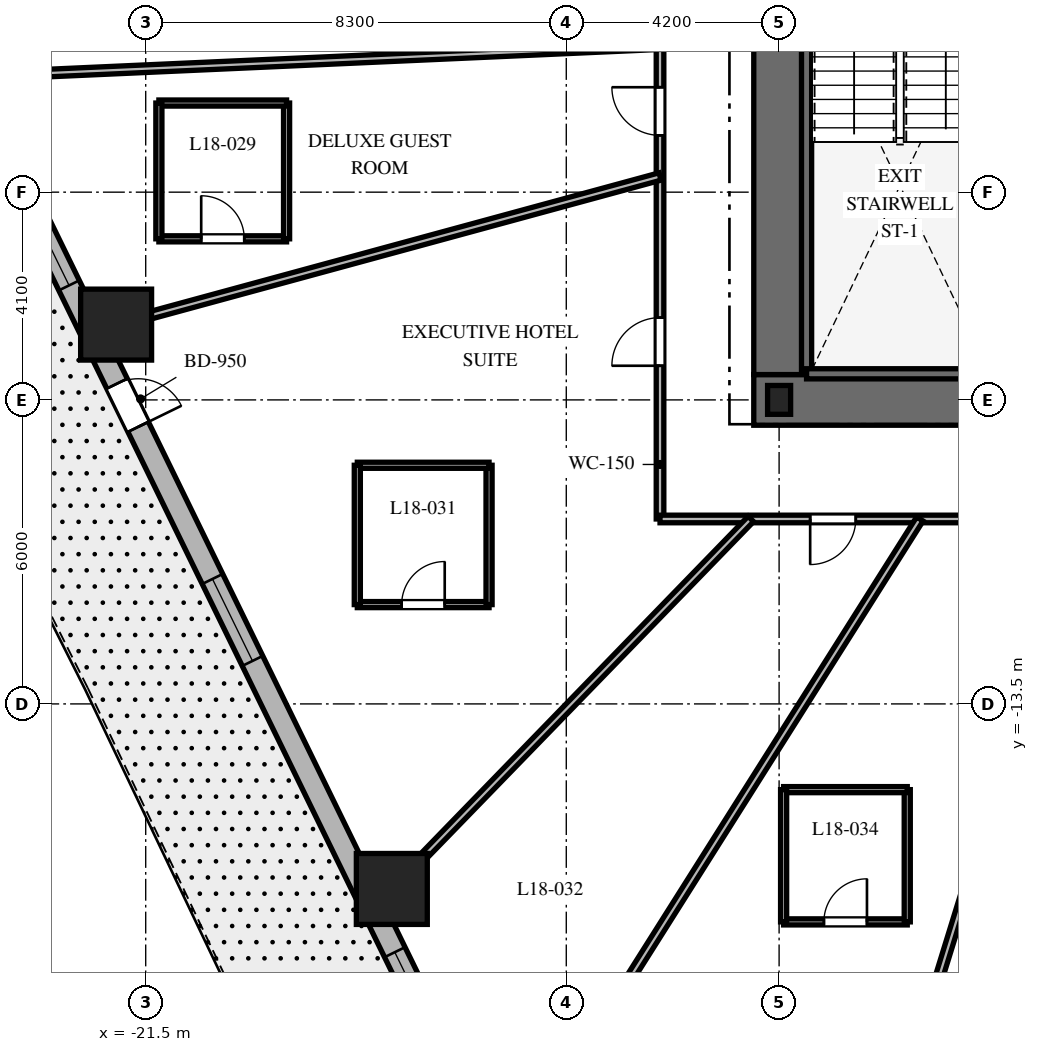
"""IFC4 building model, lengths in metres.
Left out: names, types, materials, properties, quantities, classifications, styles, units other than length and angle.
Written with IfcOpenShell. Run it as: python <this file> out.ifc"""

import sys

from ifc_helpers import new_model, si_unit, direction, frame, frame_2d, origin, origin_2d, place, context, subcontext, project, spatial, rectangle, i_section, extrude, element, fill, save


model = new_model("IFC4")
c1 = context("Model", 3, precision=1e-05, world=origin(), true_north=direction((0.0, 1.0)))
c2 = subcontext(c1, "Body", "Model", "MODEL_VIEW")
j1 = project(units=[si_unit("LENGTHUNIT", "METRE"), si_unit("PLANEANGLEUNIT", "RADIAN")], contexts=[c1])
p1 = place(None, origin())
s1 = spatial("IfcSite", under=j1, at=p1, CompositionType="ELEMENT")
p2 = place(p1, origin())
s2 = spatial("IfcBuilding", under=s1, at=p2, CompositionType="ELEMENT")
p3 = place(p2, frame((0.0, 0.0, 78.6)))
s3 = spatial("IfcBuildingStorey", under=s2, at=p3, CompositionType="ELEMENT", Elevation=78.6)
p4 = place(p3, frame((-9.5, -7.5, 0.0), z_axis=(0.0, 0.0, 1.0), x_axis=(1.0, 0.0, 0.0)))
e1 = element("IfcWall", 1, at=p4, inside=s3, PredefinedType="SHEAR", context=c2, shape_type="SweptSolid", body=[
    extrude(rectangle(XDim=19.0, YDim=1.0, at=frame_2d((9.5, 0.0))), origin(), (0.0, 0.0, 1.0), 3.7),
])
p5 = place(p4, frame((9.55, 0.0, 0.0)))
e2 = element("IfcOpeningElement", 2, at=p5, cuts=e1, PredefinedType="OPENING", context=c2, shape_type="SweptSolid", body=[
    extrude(rectangle(XDim=1.0, YDim=2.15, at=frame_2d((0.5, 1.075))), frame((0.0, 0.51, 0.0), z_axis=(0.0, -1.0, 0.0), x_axis=(1.0, 0.0, 0.0)), (0.0, 0.0, 1.0), 1.02),
])
p6 = place(p3, frame((-9.0, -7.0, 0.0), z_axis=(0.0, 0.0, 1.0), x_axis=(0.0, 1.0, 0.0)))
e3 = element("IfcWall", 3, at=p6, inside=s3, PredefinedType="SHEAR", context=c2, shape_type="SweptSolid", body=[
    extrude(rectangle(XDim=14.0, YDim=1.0, at=frame_2d((7.0, 0.0))), origin(), (0.0, 0.0, 1.0), 3.7),
])
p7 = place(p6, frame((10.125, 0.0, 0.0)))
e4 = element("IfcOpeningElement", 4, at=p7, cuts=e3, PredefinedType="OPENING", context=c2, shape_type="SweptSolid", body=[
    extrude(rectangle(XDim=1.05, YDim=2.15, at=frame_2d((0.525, 1.075))), frame((0.0, 0.51, 0.0), z_axis=(0.0, -1.0, 0.0), x_axis=(1.0, 0.0, 0.0)), (0.0, 0.0, 1.0), 1.02),
])
p8 = place(p3, frame((-8.458, -6.985, 0.0), z_axis=(0.0, 0.0, 1.0), x_axis=(0.0, 1.0, 0.0)))
e5 = element("IfcWall", 5, at=p8, inside=s3, PredefinedType="SHEAR", context=c2, shape_type="SweptSolid", body=[
    extrude(rectangle(XDim=9.143, YDim=0.2, at=frame_2d((4.572, 0.0))), origin(), (0.0, 0.0, 1.0), 3.7),
])
p9 = place(p3, frame((-8.458, -6.985, 0.0), z_axis=(0.0, 0.0, 1.0), x_axis=(1.0, 0.0, 0.0)))
e6 = element("IfcWall", 6, at=p9, inside=s3, PredefinedType="SHEAR", context=c2, shape_type="SweptSolid", body=[
    extrude(rectangle(XDim=3.686, YDim=0.2, at=frame_2d((1.843, 0.0))), origin(), (0.0, 0.0, 1.0), 3.7),
])
p10 = place(p3, frame((-9.0, -7.5, 0.0), z_axis=(0.0, 0.0, 1.0), x_axis=(1.0, 0.0, 0.0)))
e7 = element("IfcColumn", 7, at=p10, inside=s3, PredefinedType="COLUMN", context=c2, shape_type="SweptSolid", body=[
    extrude(i_section(OverallWidth=0.454, OverallDepth=0.569, WebThickness=0.078, FlangeThickness=0.125, at=origin_2d()), origin(), (0.0, 0.0, 1.0), 3.7),
])
for number, where, z_axis, x_axis in (
    (8, (-22.084, -6.014, 0.0), (0.0, 0.0, 1.0), (1.0, 0.0, 0.0)),
    (9, (-16.643, -17.152, 0.0), (0.0, 0.0, 1.0), (1.0, 0.0, 0.0)),
):
    element("IfcColumn", number, at=place(p3, frame(where, z_axis=z_axis, x_axis=x_axis)), inside=s3, PredefinedType="COLUMN", context=c2, shape_type="SweptSolid", body=[
        extrude(rectangle(XDim=1.4, YDim=1.4, at=origin_2d()), origin(), (0.0, 0.0, 1.0), 3.7),
    ])
p11 = place(p3, frame((-24.336, -2.532, 0.0), z_axis=(0.0, 0.0, 1.0), x_axis=(0.438931326393, -0.898520612291, 0.0)))
e10 = element("IfcWall", 10, at=p11, inside=s3, PredefinedType="SOLIDWALL", context=c2, shape_type="SweptSolid", body=[
    extrude(rectangle(XDim=20.623, YDim=0.45, at=frame_2d((10.312, 0.0))), origin(), (0.0, 0.0, 1.0), 3.4),
])
p12 = place(p11, frame((5.171, 0.0, 0.0)))
e11 = element("IfcOpeningElement", 11, at=p12, cuts=e10, PredefinedType="OPENING", context=c2, shape_type="SweptSolid", body=[
    extrude(rectangle(XDim=0.95, YDim=2.15, at=frame_2d((0.475, 1.075))), frame((0.0, 0.235, 0.0), z_axis=(0.0, -1.0, 0.0), x_axis=(1.0, 0.0, 0.0)), (0.0, 0.0, 1.0), 0.47),
])
p13 = place(p11, frame((1.214, 0.0, 0.8)))
e12 = element("IfcOpeningElement", 12, at=p13, cuts=e10, PredefinedType="OPENING", context=c2, shape_type="SweptSolid", body=[
    extrude(rectangle(XDim=1.8, YDim=1.8, at=frame_2d((0.9, 0.9))), frame((0.0, 0.235, 0.0), z_axis=(0.0, -1.0, 0.0), x_axis=(1.0, 0.0, 0.0)), (0.0, 0.0, 1.0), 0.47),
])
p14 = place(p11, frame((9.462, 0.0, 0.8)))
e13 = element("IfcOpeningElement", 13, at=p14, cuts=e10, PredefinedType="OPENING", context=c2, shape_type="SweptSolid", body=[
    extrude(rectangle(XDim=1.8, YDim=1.8, at=frame_2d((0.9, 0.9))), frame((0.0, 0.235, 0.0), z_axis=(0.0, -1.0, 0.0), x_axis=(1.0, 0.0, 0.0)), (0.0, 0.0, 1.0), 0.47),
])
p15 = place(p11, frame((17.66, 0.0, 0.8)))
e14 = element("IfcOpeningElement", 14, at=p15, cuts=e10, PredefinedType="OPENING", context=c2, shape_type="SweptSolid", body=[
    extrude(rectangle(XDim=1.8, YDim=1.8, at=frame_2d((0.9, 0.9))), frame((0.0, 0.235, 0.0), z_axis=(0.0, -1.0, 0.0), x_axis=(1.0, 0.0, 0.0)), (0.0, 0.0, 1.0), 0.47),
])
p16 = place(p3, frame((-11.35, -9.85, 0.0), z_axis=(0.0, 0.0, 1.0), x_axis=(0.0, 1.0, 0.0)))
e15 = element("IfcWall", 15, at=p16, inside=s3, PredefinedType="PARTITIONING", context=c2, shape_type="SweptSolid", body=[
    extrude(rectangle(XDim=19.7, YDim=0.15, at=frame_2d((9.85, 0.0))), origin(), (0.0, 0.0, 1.0), 2.84),
])
p17 = place(p16, frame((17.206, 0.0, 0.0)))
e16 = element("IfcOpeningElement", 16, at=p17, cuts=e15, PredefinedType="OPENING", context=c2, shape_type="SweptSolid", body=[
    extrude(rectangle(XDim=0.9, YDim=2.03, at=frame_2d((0.45, 1.015))), frame((0.0, 0.085, 0.0), z_axis=(0.0, -1.0, 0.0), x_axis=(1.0, 0.0, 0.0)), (0.0, 0.0, 1.0), 0.17),
])
p18 = place(p16, frame((13.403, 0.0, 0.0)))
e17 = element("IfcOpeningElement", 17, at=p18, cuts=e15, PredefinedType="OPENING", context=c2, shape_type="SweptSolid", body=[
    extrude(rectangle(XDim=0.95, YDim=2.03, at=frame_2d((0.475, 1.015))), frame((0.0, 0.085, 0.0), z_axis=(0.0, -1.0, 0.0), x_axis=(1.0, 0.0, 0.0)), (0.0, 0.0, 1.0), 0.17),
])
p19 = place(p16, frame((10.134, 0.0, 0.0)))
e18 = element("IfcOpeningElement", 18, at=p19, cuts=e15, PredefinedType="OPENING", context=c2, shape_type="SweptSolid", body=[
    extrude(rectangle(XDim=0.95, YDim=2.03, at=frame_2d((0.475, 1.015))), frame((0.0, 0.085, 0.0), z_axis=(0.0, -1.0, 0.0), x_axis=(1.0, 0.0, 0.0)), (0.0, 0.0, 1.0), 0.17),
])
p20 = place(p16, frame((7.571, 0.0, 0.0)))
e19 = element("IfcOpeningElement", 19, at=p20, cuts=e15, PredefinedType="OPENING", context=c2, shape_type="SweptSolid", body=[
    extrude(rectangle(XDim=0.95, YDim=2.03, at=frame_2d((0.475, 1.015))), frame((0.0, 0.085, 0.0), z_axis=(0.0, -1.0, 0.0), x_axis=(1.0, 0.0, 0.0)), (0.0, 0.0, 1.0), 0.17),
])
p21 = place(p16, frame((3.024, 0.0, 0.0)))
e20 = element("IfcOpeningElement", 20, at=p21, cuts=e15, PredefinedType="OPENING", context=c2, shape_type="SweptSolid", body=[
    extrude(rectangle(XDim=0.95, YDim=2.03, at=frame_2d((0.475, 1.015))), frame((0.0, 0.085, 0.0), z_axis=(0.0, -1.0, 0.0), x_axis=(1.0, 0.0, 0.0)), (0.0, 0.0, 1.0), 0.17),
])
p22 = place(p3, frame((11.35, -9.85, 0.0), z_axis=(0.0, 0.0, 1.0), x_axis=(-1.0, 0.0, 0.0)))
e21 = element("IfcWall", 21, at=p22, inside=s3, PredefinedType="PARTITIONING", context=c2, shape_type="SweptSolid", body=[
    extrude(rectangle(XDim=22.7, YDim=0.15, at=frame_2d((11.35, 0.0))), origin(), (0.0, 0.0, 1.0), 2.84),
])
p23 = place(p22, frame((18.837, 0.0, 0.0)))
e22 = element("IfcOpeningElement", 22, at=p23, cuts=e21, PredefinedType="OPENING", context=c2, shape_type="SweptSolid", body=[
    extrude(rectangle(XDim=0.9, YDim=2.03, at=frame_2d((0.45, 1.015))), frame((0.0, 0.085, 0.0), z_axis=(0.0, -1.0, 0.0), x_axis=(1.0, 0.0, 0.0)), (0.0, 0.0, 1.0), 0.17),
])
p24 = place(p22, frame((15.532, 0.0, 0.0)))
e23 = element("IfcOpeningElement", 23, at=p24, cuts=e21, PredefinedType="OPENING", context=c2, shape_type="SweptSolid", body=[
    extrude(rectangle(XDim=0.95, YDim=2.03, at=frame_2d((0.475, 1.015))), frame((0.0, 0.085, 0.0), z_axis=(0.0, -1.0, 0.0), x_axis=(1.0, 0.0, 0.0)), (0.0, 0.0, 1.0), 0.17),
])
p25 = place(p22, frame((10.444, 0.0, 0.0)))
e24 = element("IfcOpeningElement", 24, at=p25, cuts=e21, PredefinedType="OPENING", context=c2, shape_type="SweptSolid", body=[
    extrude(rectangle(XDim=0.95, YDim=2.03, at=frame_2d((0.475, 1.015))), frame((0.0, 0.085, 0.0), z_axis=(0.0, -1.0, 0.0), x_axis=(1.0, 0.0, 0.0)), (0.0, 0.0, 1.0), 0.17),
])
p26 = place(p22, frame((3.369, 0.0, 0.0)))
e25 = element("IfcOpeningElement", 25, at=p26, cuts=e21, PredefinedType="OPENING", context=c2, shape_type="SweptSolid", body=[
    extrude(rectangle(XDim=0.95, YDim=2.03, at=frame_2d((0.475, 1.015))), frame((0.0, 0.085, 0.0), z_axis=(0.0, -1.0, 0.0), x_axis=(1.0, 0.0, 0.0)), (0.0, 0.0, 1.0), 0.17),
])
p27 = place(p3, frame((-11.35, -0.508, 0.0), z_axis=(0.0, 0.0, 1.0), x_axis=(-0.998998237556, -0.044749540337, 0.0)))
e26 = element("IfcWall", 26, at=p27, inside=s3, PredefinedType="PARTITIONING", context=c2, shape_type="SweptSolid", body=[
    extrude(rectangle(XDim=13.159, YDim=0.15, at=frame_2d((6.58, 0.0))), origin(), (0.0, 0.0, 1.0), 2.54),
])
p28 = place(p3, frame((-11.35, -3.091, 0.0), z_axis=(0.0, 0.0, 1.0), x_axis=(-0.964859685283, -0.262765651704, 0.0)))
e27 = element("IfcWall", 27, at=p28, inside=s3, PredefinedType="PARTITIONING", context=c2, shape_type="SweptSolid", body=[
    extrude(rectangle(XDim=11.629, YDim=0.15, at=frame_2d((5.814, 0.0))), origin(), (0.0, 0.0, 1.0), 2.54),
])
p29 = place(p3, frame((-9.558, -9.85, 0.0), z_axis=(0.0, 0.0, 1.0), x_axis=(-0.69638346089, -0.717669893056, 0.0)))
e28 = element("IfcWall", 28, at=p29, inside=s3, PredefinedType="PARTITIONING", context=c2, shape_type="SweptSolid", body=[
    extrude(rectangle(XDim=10.701, YDim=0.15, at=frame_2d((5.351, 0.0))), origin(), (0.0, 0.0, 1.0), 2.54),
])
p30 = place(p3, frame((-6.222, -9.85, 0.0), z_axis=(0.0, 0.0, 1.0), x_axis=(-0.534069056435, -0.845440857162, 0.0)))
e29 = element("IfcWall", 29, at=p30, inside=s3, PredefinedType="PARTITIONING", context=c2, shape_type="SweptSolid", body=[
    extrude(rectangle(XDim=14.611, YDim=0.15, at=frame_2d((7.306, 0.0))), origin(), (0.0, 0.0, 1.0), 2.54),
])
p31 = place(p3, frame((-3.048, -9.85, 0.0), z_axis=(0.0, 0.0, 1.0), x_axis=(-0.295553992761, -0.955326037206, 0.0)))
e30 = element("IfcWall", 30, at=p31, inside=s3, PredefinedType="PARTITIONING", context=c2, shape_type="SweptSolid", body=[
    extrude(rectangle(XDim=13.739, YDim=0.15, at=frame_2d((6.869, 0.0))), origin(), (0.0, 0.0, 1.0), 2.54),
])
p32 = place(p3, frame((-21.24, -4.321, 0.0), z_axis=(0.0, 0.0, 1.0), x_axis=(1.0, 0.0, 0.0)))
e31 = element("IfcWall", 31, at=p32, inside=s3, PredefinedType="PARTITIONING", context=c2, shape_type="SweptSolid", body=[
    extrude(rectangle(XDim=2.52, YDim=0.12, at=frame_2d((1.26, 0.0))), origin(), (0.0, 0.0, 1.0), 3.4),
])
p33 = place(p32, frame((0.835, 0.0, 0.0)))
e32 = element("IfcOpeningElement", 32, at=p33, cuts=e31, PredefinedType="OPENING", context=c2, shape_type="SweptSolid", body=[
    extrude(rectangle(XDim=0.85, YDim=2.03, at=frame_2d((0.425, 1.015))), frame((0.0, 0.07, 0.0), z_axis=(0.0, -1.0, 0.0), x_axis=(1.0, 0.0, 0.0)), (0.0, 0.0, 1.0), 0.14),
])
p34 = place(p3, frame((-18.72, -4.321, 0.0), z_axis=(0.0, 0.0, 1.0), x_axis=(0.0, 1.0, 0.0)))
e33 = element("IfcWall", 33, at=p34, inside=s3, PredefinedType="PARTITIONING", context=c2, shape_type="SweptSolid", body=[
    extrude(rectangle(XDim=2.68, YDim=0.12, at=frame_2d((1.34, 0.0))), origin(), (0.0, 0.0, 1.0), 3.4),
])
p35 = place(p3, frame((-18.72, -1.641, 0.0), z_axis=(0.0, 0.0, 1.0), x_axis=(-1.0, 0.0, 0.0)))
e34 = element("IfcWall", 34, at=p35, inside=s3, PredefinedType="PARTITIONING", context=c2, shape_type="SweptSolid", body=[
    extrude(rectangle(XDim=2.52, YDim=0.12, at=frame_2d((1.26, 0.0))), origin(), (0.0, 0.0, 1.0), 3.4),
])
p36 = place(p3, frame((-21.24, -1.641, 0.0), z_axis=(0.0, 0.0, 1.0), x_axis=(0.0, -1.0, 0.0)))
e35 = element("IfcWall", 35, at=p36, inside=s3, PredefinedType="PARTITIONING", context=c2, shape_type="SweptSolid", body=[
    extrude(rectangle(XDim=2.68, YDim=0.12, at=frame_2d((1.34, 0.0))), origin(), (0.0, 0.0, 1.0), 3.4),
])
p37 = place(p3, frame((-17.324, -11.54, 0.0), z_axis=(0.0, 0.0, 1.0), x_axis=(1.0, 0.0, 0.0)))
e36 = element("IfcWall", 36, at=p37, inside=s3, PredefinedType="PARTITIONING", context=c2, shape_type="SweptSolid", body=[
    extrude(rectangle(XDim=2.6, YDim=0.12, at=frame_2d((1.3, 0.0))), origin(), (0.0, 0.0, 1.0), 2.927),
])
p38 = place(p37, frame((0.875, 0.0, 0.0)))
e37 = element("IfcOpeningElement", 37, at=p38, cuts=e36, PredefinedType="OPENING", context=c2, shape_type="SweptSolid", body=[
    extrude(rectangle(XDim=0.85, YDim=2.03, at=frame_2d((0.425, 1.015))), frame((0.0, 0.07, 0.0), z_axis=(0.0, -1.0, 0.0), x_axis=(1.0, 0.0, 0.0)), (0.0, 0.0, 1.0), 0.14),
])
p39 = place(p3, frame((-14.724, -11.54, 0.0), z_axis=(0.0, 0.0, 1.0), x_axis=(0.0, 1.0, 0.0)))
e38 = element("IfcWall", 38, at=p39, inside=s3, PredefinedType="PARTITIONING", context=c2, shape_type="SweptSolid", body=[
    extrude(rectangle(XDim=2.75, YDim=0.12, at=frame_2d((1.375, 0.0))), origin(), (0.0, 0.0, 1.0), 3.4),
])
p40 = place(p3, frame((-14.724, -8.79, 0.0), z_axis=(0.0, 0.0, 1.0), x_axis=(-1.0, 0.0, 0.0)))
e39 = element("IfcWall", 39, at=p40, inside=s3, PredefinedType="PARTITIONING", context=c2, shape_type="SweptSolid", body=[
    extrude(rectangle(XDim=2.6, YDim=0.12, at=frame_2d((1.3, 0.0))), origin(), (0.0, 0.0, 1.0), 2.927),
])
p41 = place(p3, frame((-17.324, -8.79, 0.0), z_axis=(0.0, 0.0, 1.0), x_axis=(0.0, -1.0, 0.0)))
e40 = element("IfcWall", 40, at=p41, inside=s3, PredefinedType="PARTITIONING", context=c2, shape_type="SweptSolid", body=[
    extrude(rectangle(XDim=2.75, YDim=0.12, at=frame_2d((1.375, 0.0))), origin(), (0.0, 0.0, 1.0), 3.4),
])
p42 = place(p3, frame((-8.911, -17.802, 0.0), z_axis=(0.0, 0.0, 1.0), x_axis=(1.0, 0.0, 0.0)))
e41 = element("IfcWall", 41, at=p42, inside=s3, PredefinedType="PARTITIONING", context=c2, shape_type="SweptSolid", body=[
    extrude(rectangle(XDim=2.44, YDim=0.12, at=frame_2d((1.22, 0.0))), origin(), (0.0, 0.0, 1.0), 2.84),
])
p43 = place(p42, frame((0.795, 0.0, 0.0)))
e42 = element("IfcOpeningElement", 42, at=p43, cuts=e41, PredefinedType="OPENING", context=c2, shape_type="SweptSolid", body=[
    extrude(rectangle(XDim=0.85, YDim=2.03, at=frame_2d((0.425, 1.015))), frame((0.0, 0.07, 0.0), z_axis=(0.0, -1.0, 0.0), x_axis=(1.0, 0.0, 0.0)), (0.0, 0.0, 1.0), 0.14),
])
p44 = place(p3, frame((-6.471, -17.802, 0.0), z_axis=(0.0, 0.0, 1.0), x_axis=(0.0, 1.0, 0.0)))
e43 = element("IfcWall", 43, at=p44, inside=s3, PredefinedType="PARTITIONING", context=c2, shape_type="SweptSolid", body=[
    extrude(rectangle(XDim=2.61, YDim=0.12, at=frame_2d((1.305, 0.0))), origin(), (0.0, 0.0, 1.0), 2.84),
])
p45 = place(p3, frame((-6.471, -15.192, 0.0), z_axis=(0.0, 0.0, 1.0), x_axis=(-1.0, 0.0, 0.0)))
e44 = element("IfcWall", 44, at=p45, inside=s3, PredefinedType="PARTITIONING", context=c2, shape_type="SweptSolid", body=[
    extrude(rectangle(XDim=2.44, YDim=0.12, at=frame_2d((1.22, 0.0))), origin(), (0.0, 0.0, 1.0), 2.84),
])
p46 = place(p3, frame((-8.911, -15.192, 0.0), z_axis=(0.0, 0.0, 1.0), x_axis=(0.0, -1.0, 0.0)))
e45 = element("IfcWall", 45, at=p46, inside=s3, PredefinedType="PARTITIONING", context=c2, shape_type="SweptSolid", body=[
    extrude(rectangle(XDim=2.61, YDim=0.12, at=frame_2d((1.305, 0.0))), origin(), (0.0, 0.0, 1.0), 2.972),
])
p47 = place(p12, origin())
e46 = element("IfcDoor", 46, at=p47, inside=s3, OperationType="SINGLE_SWING_RIGHT", PredefinedType="DOOR", context=c2, shape_type="SweptSolid", body=[
    extrude(rectangle(XDim=0.95, YDim=2.15, at=frame_2d((0.475, 1.075))), frame((0.0, 0.025, 0.0), z_axis=(0.0, -1.0, 0.0), x_axis=(1.0, 0.0, 0.0)), (0.0, 0.0, 1.0), 0.05),
])
fill(e11, e46)
p48 = place(p13, origin())
e47 = element("IfcWindow", 47, at=p48, inside=s3, PartitioningType="SINGLE_PANEL", PredefinedType="WINDOW", context=c2, shape_type="SweptSolid", body=[
    extrude(rectangle(XDim=1.8, YDim=1.8, at=frame_2d((0.9, 0.9))), frame((0.0, 0.03, 0.0), z_axis=(0.0, -1.0, 0.0), x_axis=(1.0, 0.0, 0.0)), (0.0, 0.0, 1.0), 0.06),
])
fill(e12, e47)
p49 = place(p14, origin())
e48 = element("IfcWindow", 48, at=p49, inside=s3, PartitioningType="SINGLE_PANEL", PredefinedType="WINDOW", context=c2, shape_type="SweptSolid", body=[
    extrude(rectangle(XDim=1.8, YDim=1.8, at=frame_2d((0.9, 0.9))), frame((0.0, 0.03, 0.0), z_axis=(0.0, -1.0, 0.0), x_axis=(1.0, 0.0, 0.0)), (0.0, 0.0, 1.0), 0.06),
])
fill(e13, e48)
p50 = place(p15, origin())
e49 = element("IfcWindow", 49, at=p50, inside=s3, PartitioningType="SINGLE_PANEL", PredefinedType="WINDOW", context=c2, shape_type="SweptSolid", body=[
    extrude(rectangle(XDim=1.8, YDim=1.8, at=frame_2d((0.9, 0.9))), frame((0.0, 0.03, 0.0), z_axis=(0.0, -1.0, 0.0), x_axis=(1.0, 0.0, 0.0)), (0.0, 0.0, 1.0), 0.06),
])
fill(e14, e49)
p51 = place(p20, origin())
e50 = element("IfcDoor", 50, at=p51, inside=s3, OperationType="SINGLE_SWING_RIGHT", PredefinedType="DOOR", context=c2, shape_type="SweptSolid", body=[
    extrude(rectangle(XDim=0.95, YDim=2.03, at=frame_2d((0.475, 1.015))), frame((0.0, 0.025, 0.0), z_axis=(0.0, -1.0, 0.0), x_axis=(1.0, 0.0, 0.0)), (0.0, 0.0, 1.0), 0.05),
])
fill(e19, e50)
p52 = place(p33, origin())
e51 = element("IfcDoor", 51, at=p52, inside=s3, OperationType="SINGLE_SWING_LEFT", PredefinedType="DOOR", context=c2, shape_type="SweptSolid", body=[
    extrude(rectangle(XDim=0.85, YDim=2.03, at=frame_2d((0.425, 1.015))), frame((0.0, 0.025, 0.0), z_axis=(0.0, -1.0, 0.0), x_axis=(1.0, 0.0, 0.0)), (0.0, 0.0, 1.0), 0.05),
])
fill(e32, e51)
p53 = place(p21, origin())
e52 = element("IfcDoor", 52, at=p53, inside=s3, OperationType="SINGLE_SWING_LEFT", PredefinedType="DOOR", context=c2, shape_type="SweptSolid", body=[
    extrude(rectangle(XDim=0.95, YDim=2.03, at=frame_2d((0.475, 1.015))), frame((0.0, 0.025, 0.0), z_axis=(0.0, -1.0, 0.0), x_axis=(1.0, 0.0, 0.0)), (0.0, 0.0, 1.0), 0.05),
])
fill(e20, e52)
p54 = place(p38, origin())
e53 = element("IfcDoor", 53, at=p54, inside=s3, OperationType="SINGLE_SWING_RIGHT", PredefinedType="DOOR", context=c2, shape_type="SweptSolid", body=[
    extrude(rectangle(XDim=0.85, YDim=2.03, at=frame_2d((0.425, 1.015))), frame((0.0, 0.025, 0.0), z_axis=(0.0, -1.0, 0.0), x_axis=(1.0, 0.0, 0.0)), (0.0, 0.0, 1.0), 0.05),
])
fill(e37, e53)
p55 = place(p23, origin())
e54 = element("IfcDoor", 54, at=p55, inside=s3, OperationType="SINGLE_SWING_RIGHT", PredefinedType="DOOR", context=c2, shape_type="SweptSolid", body=[
    extrude(rectangle(XDim=0.9, YDim=2.03, at=frame_2d((0.45, 1.015))), frame((0.0, 0.025, 0.0), z_axis=(0.0, -1.0, 0.0), x_axis=(1.0, 0.0, 0.0)), (0.0, 0.0, 1.0), 0.05),
])
fill(e22, e54)
p56 = place(p43, origin())
e55 = element("IfcDoor", 55, at=p56, inside=s3, OperationType="SINGLE_SWING_RIGHT", PredefinedType="DOOR", context=c2, shape_type="SweptSolid", body=[
    extrude(rectangle(XDim=0.85, YDim=2.03, at=frame_2d((0.425, 1.015))), frame((0.0, 0.025, 0.0), z_axis=(0.0, -1.0, 0.0), x_axis=(1.0, 0.0, 0.0)), (0.0, 0.0, 1.0), 0.05),
])
fill(e42, e55)
save(model, sys.argv[1])
